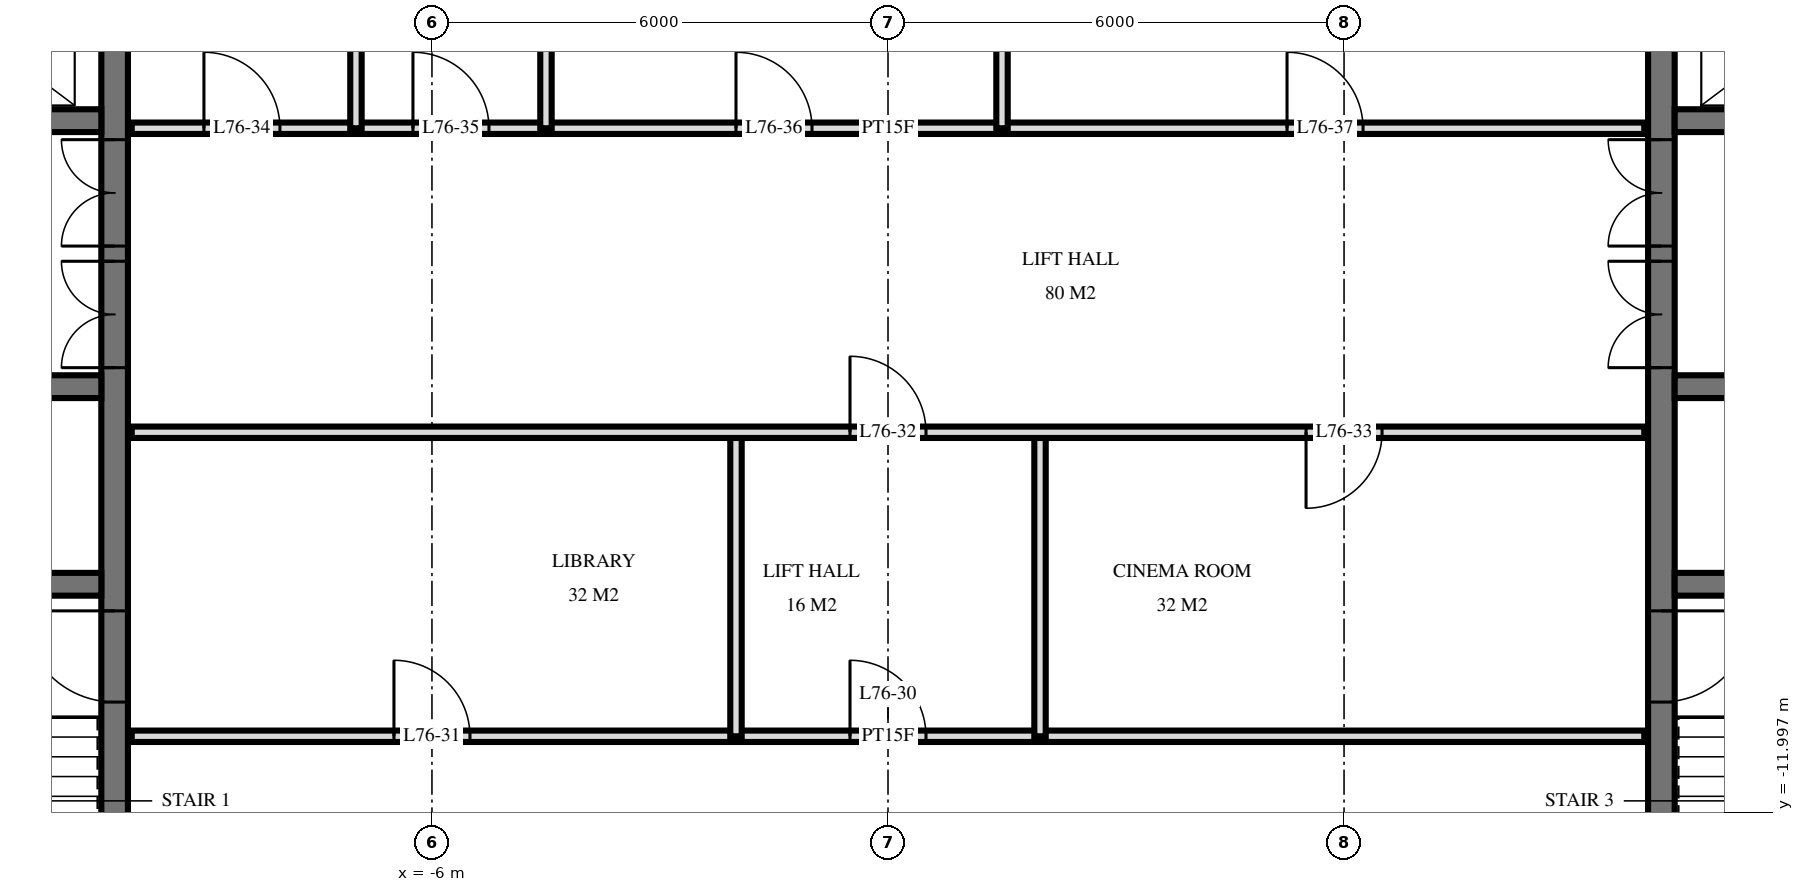
"""IFC4 building model, lengths in metres.
Left out: names, types, materials, properties, quantities, classifications, styles, units other than length and angle.
Written with IfcOpenShell. Run it as: python <this file> out.ifc"""

import sys

from ifc_helpers import new_model, si_unit, direction, frame, frame_2d, origin, place, context, subcontext, project, spatial, rectangle, extrude, element, fill, save


model = new_model("IFC4")
c1 = context("Model", 3, precision=1e-05, world=origin(), true_north=direction((0.0, 1.0)))
c2 = subcontext(c1, "Body", "Model", "MODEL_VIEW")
j1 = project(units=[si_unit("LENGTHUNIT", "METRE"), si_unit("PLANEANGLEUNIT", "RADIAN")], contexts=[c1])
p1 = place(None, origin())
s1 = spatial("IfcSite", under=j1, at=p1, CompositionType="ELEMENT")
p2 = place(p1, origin())
s2 = spatial("IfcBuilding", under=s1, at=p2, CompositionType="ELEMENT")
p3 = place(p2, frame((0.0, 0.0, 287.6)))
s3 = spatial("IfcBuildingStorey", under=s2, at=p3, CompositionType="ELEMENT", Elevation=287.6)
p4 = place(p3, frame((-10.175, -14.55, 0.0), z_axis=(0.0, 0.0, 1.0), x_axis=(0.0, 1.0, 0.0)))
e1 = element("IfcWall", 1, at=p4, inside=s3, PredefinedType="SHEAR", context=c2, shape_type="SweptSolid", body=[
    extrude(rectangle(XDim=14.1, YDim=0.35, at=frame_2d((7.05, 0.0))), origin(), (0.0, 0.0, 1.0), 3.5),
])
p5 = place(p4, frame((8.4, 0.0, 0.0)))
e2 = element("IfcOpeningElement", 2, at=p5, cuts=e1, PredefinedType="OPENING", context=c2, shape_type="SweptSolid", body=[
    extrude(rectangle(XDim=1.4, YDim=2.4, at=frame_2d((0.7, 1.2))), frame((0.0, 0.185, 0.0), z_axis=(0.0, -1.0, 0.0), x_axis=(1.0, 0.0, 0.0)), (0.0, 0.0, 1.0), 0.37),
])
p6 = place(p4, frame((10.0, 0.0, 0.0)))
e3 = element("IfcOpeningElement", 3, at=p6, cuts=e1, PredefinedType="OPENING", context=c2, shape_type="SweptSolid", body=[
    extrude(rectangle(XDim=1.4, YDim=2.4, at=frame_2d((0.7, 1.2))), frame((0.0, 0.185, 0.0), z_axis=(0.0, -1.0, 0.0), x_axis=(1.0, 0.0, 0.0)), (0.0, 0.0, 1.0), 0.37),
])
p7 = place(p4, frame((4.0, 0.0, 0.0)))
e4 = element("IfcOpeningElement", 4, at=p7, cuts=e1, PredefinedType="OPENING", context=c2, shape_type="SweptSolid", body=[
    extrude(rectangle(XDim=1.2, YDim=2.1, at=frame_2d((0.6, 1.05))), frame((0.0, 0.185, 0.0), z_axis=(0.0, -1.0, 0.0), x_axis=(1.0, 0.0, 0.0)), (0.0, 0.0, 1.0), 0.37),
])
p8 = place(p3, frame((-19.05, -2.9, 0.0), z_axis=(0.0, 0.0, 1.0), x_axis=(1.0, 0.0, 0.0)))
e5 = element("IfcWall", 5, at=p8, inside=s3, PredefinedType="SHEAR", context=c2, shape_type="SweptSolid", body=[
    extrude(rectangle(XDim=8.7, YDim=0.3, at=frame_2d((4.35, 0.0))), origin(), (0.0, 0.0, 1.0), 3.5),
])
p9 = place(p8, frame((6.8, 0.0, 0.0)))
e6 = element("IfcOpeningElement", 6, at=p9, cuts=e5, PredefinedType="OPENING", context=c2, shape_type="SweptSolid", body=[
    extrude(rectangle(XDim=1.1, YDim=2.1, at=frame_2d((0.55, 1.05))), frame((0.0, 0.16, 0.0), z_axis=(0.0, -1.0, 0.0), x_axis=(1.0, 0.0, 0.0)), (0.0, 0.0, 1.0), 0.32),
])
p10 = place(p8, frame((3.8, 0.0, 0.0)))
e7 = element("IfcOpeningElement", 7, at=p10, cuts=e5, PredefinedType="OPENING", context=c2, shape_type="SweptSolid", body=[
    extrude(rectangle(XDim=1.1, YDim=2.1, at=frame_2d((0.55, 1.05))), frame((0.0, 0.16, 0.0), z_axis=(0.0, -1.0, 0.0), x_axis=(1.0, 0.0, 0.0)), (0.0, 0.0, 1.0), 0.32),
])
p11 = place(p8, frame((1.613, 0.0, 0.0)))
e8 = element("IfcOpeningElement", 8, at=p11, cuts=e5, PredefinedType="OPENING", context=c2, shape_type="SweptSolid", body=[
    extrude(rectangle(XDim=0.9, YDim=2.1, at=frame_2d((0.45, 1.05))), frame((0.0, 0.16, 0.0), z_axis=(0.0, -1.0, 0.0), x_axis=(1.0, 0.0, 0.0)), (0.0, 0.0, 1.0), 0.32),
])
p12 = place(p8, frame((0.188, 0.0, 0.0)))
e9 = element("IfcOpeningElement", 9, at=p12, cuts=e5, PredefinedType="OPENING", context=c2, shape_type="SweptSolid", body=[
    extrude(rectangle(XDim=0.9, YDim=2.1, at=frame_2d((0.45, 1.05))), frame((0.0, 0.16, 0.0), z_axis=(0.0, -1.0, 0.0), x_axis=(1.0, 0.0, 0.0)), (0.0, 0.0, 1.0), 0.32),
])
p13 = place(p3, frame((-19.05, -6.4, 0.0), z_axis=(0.0, 0.0, 1.0), x_axis=(1.0, 0.0, 0.0)))
e10 = element("IfcWall", 10, at=p13, inside=s3, PredefinedType="SHEAR", context=c2, shape_type="SweptSolid", body=[
    extrude(rectangle(XDim=8.7, YDim=0.3, at=frame_2d((4.35, 0.0))), origin(), (0.0, 0.0, 1.0), 3.5),
])
p14 = place(p13, frame((0.8, 0.0, 0.0)))
e11 = element("IfcOpeningElement", 11, at=p14, cuts=e10, PredefinedType="OPENING", context=c2, shape_type="SweptSolid", body=[
    extrude(rectangle(XDim=1.1, YDim=2.1, at=frame_2d((0.55, 1.05))), frame((0.0, 0.16, 0.0), z_axis=(0.0, -1.0, 0.0), x_axis=(1.0, 0.0, 0.0)), (0.0, 0.0, 1.0), 0.32),
])
p15 = place(p3, frame((-19.05, -9.0, 0.0), z_axis=(0.0, 0.0, 1.0), x_axis=(1.0, 0.0, 0.0)))
e12 = element("IfcWall", 12, at=p15, inside=s3, PredefinedType="SHEAR", context=c2, shape_type="SweptSolid", body=[
    extrude(rectangle(XDim=8.7, YDim=0.3, at=frame_2d((4.35, 0.0))), origin(), (0.0, 0.0, 1.0), 3.5),
])
p16 = place(p15, frame((3.8, 0.0, 0.0)))
e13 = element("IfcOpeningElement", 13, at=p16, cuts=e12, PredefinedType="OPENING", context=c2, shape_type="SweptSolid", body=[
    extrude(rectangle(XDim=1.1, YDim=2.1, at=frame_2d((0.55, 1.05))), frame((0.0, 0.16, 0.0), z_axis=(0.0, -1.0, 0.0), x_axis=(1.0, 0.0, 0.0)), (0.0, 0.0, 1.0), 0.32),
])
p17 = place(p3, frame((10.175, -14.55, 0.0), z_axis=(0.0, 0.0, 1.0), x_axis=(0.0, 1.0, 0.0)))
e14 = element("IfcWall", 14, at=p17, inside=s3, PredefinedType="SHEAR", context=c2, shape_type="SweptSolid", body=[
    extrude(rectangle(XDim=14.1, YDim=0.35, at=frame_2d((7.05, 0.0))), origin(), (0.0, 0.0, 1.0), 3.5),
])
p18 = place(p17, frame((8.4, 0.0, 0.0)))
e15 = element("IfcOpeningElement", 15, at=p18, cuts=e14, PredefinedType="OPENING", context=c2, shape_type="SweptSolid", body=[
    extrude(rectangle(XDim=1.4, YDim=2.4, at=frame_2d((0.7, 1.2))), frame((0.0, 0.185, 0.0), z_axis=(0.0, -1.0, 0.0), x_axis=(1.0, 0.0, 0.0)), (0.0, 0.0, 1.0), 0.37),
])
p19 = place(p17, frame((10.0, 0.0, 0.0)))
e16 = element("IfcOpeningElement", 16, at=p19, cuts=e14, PredefinedType="OPENING", context=c2, shape_type="SweptSolid", body=[
    extrude(rectangle(XDim=1.4, YDim=2.4, at=frame_2d((0.7, 1.2))), frame((0.0, 0.185, 0.0), z_axis=(0.0, -1.0, 0.0), x_axis=(1.0, 0.0, 0.0)), (0.0, 0.0, 1.0), 0.37),
])
p20 = place(p17, frame((4.0, 0.0, 0.0)))
e17 = element("IfcOpeningElement", 17, at=p20, cuts=e14, PredefinedType="OPENING", context=c2, shape_type="SweptSolid", body=[
    extrude(rectangle(XDim=1.2, YDim=2.1, at=frame_2d((0.6, 1.05))), frame((0.0, 0.185, 0.0), z_axis=(0.0, -1.0, 0.0), x_axis=(1.0, 0.0, 0.0)), (0.0, 0.0, 1.0), 0.37),
])
p21 = place(p3, frame((10.35, -2.9, 0.0), z_axis=(0.0, 0.0, 1.0), x_axis=(1.0, 0.0, 0.0)))
e18 = element("IfcWall", 18, at=p21, inside=s3, PredefinedType="SHEAR", context=c2, shape_type="SweptSolid", body=[
    extrude(rectangle(XDim=8.7, YDim=0.3, at=frame_2d((4.35, 0.0))), origin(), (0.0, 0.0, 1.0), 3.5),
])
p22 = place(p21, frame((0.8, 0.0, 0.0)))
e19 = element("IfcOpeningElement", 19, at=p22, cuts=e18, PredefinedType="OPENING", context=c2, shape_type="SweptSolid", body=[
    extrude(rectangle(XDim=1.1, YDim=2.1, at=frame_2d((0.55, 1.05))), frame((0.0, 0.16, 0.0), z_axis=(0.0, -1.0, 0.0), x_axis=(1.0, 0.0, 0.0)), (0.0, 0.0, 1.0), 0.32),
])
p23 = place(p21, frame((3.8, 0.0, 0.0)))
e20 = element("IfcOpeningElement", 20, at=p23, cuts=e18, PredefinedType="OPENING", context=c2, shape_type="SweptSolid", body=[
    extrude(rectangle(XDim=1.1, YDim=2.1, at=frame_2d((0.55, 1.05))), frame((0.0, 0.16, 0.0), z_axis=(0.0, -1.0, 0.0), x_axis=(1.0, 0.0, 0.0)), (0.0, 0.0, 1.0), 0.32),
])
p24 = place(p21, frame((6.188, 0.0, 0.0)))
e21 = element("IfcOpeningElement", 21, at=p24, cuts=e18, PredefinedType="OPENING", context=c2, shape_type="SweptSolid", body=[
    extrude(rectangle(XDim=0.9, YDim=2.1, at=frame_2d((0.45, 1.05))), frame((0.0, 0.16, 0.0), z_axis=(0.0, -1.0, 0.0), x_axis=(1.0, 0.0, 0.0)), (0.0, 0.0, 1.0), 0.32),
])
p25 = place(p21, frame((7.613, 0.0, 0.0)))
e22 = element("IfcOpeningElement", 22, at=p25, cuts=e18, PredefinedType="OPENING", context=c2, shape_type="SweptSolid", body=[
    extrude(rectangle(XDim=0.9, YDim=2.1, at=frame_2d((0.45, 1.05))), frame((0.0, 0.16, 0.0), z_axis=(0.0, -1.0, 0.0), x_axis=(1.0, 0.0, 0.0)), (0.0, 0.0, 1.0), 0.32),
])
p26 = place(p3, frame((10.35, -6.4, 0.0), z_axis=(0.0, 0.0, 1.0), x_axis=(1.0, 0.0, 0.0)))
e23 = element("IfcWall", 23, at=p26, inside=s3, PredefinedType="SHEAR", context=c2, shape_type="SweptSolid", body=[
    extrude(rectangle(XDim=8.7, YDim=0.3, at=frame_2d((4.35, 0.0))), origin(), (0.0, 0.0, 1.0), 3.5),
])
p27 = place(p26, frame((6.8, 0.0, 0.0)))
e24 = element("IfcOpeningElement", 24, at=p27, cuts=e23, PredefinedType="OPENING", context=c2, shape_type="SweptSolid", body=[
    extrude(rectangle(XDim=1.1, YDim=2.1, at=frame_2d((0.55, 1.05))), frame((0.0, 0.16, 0.0), z_axis=(0.0, -1.0, 0.0), x_axis=(1.0, 0.0, 0.0)), (0.0, 0.0, 1.0), 0.32),
])
p28 = place(p3, frame((10.35, -9.0, 0.0), z_axis=(0.0, 0.0, 1.0), x_axis=(1.0, 0.0, 0.0)))
e25 = element("IfcWall", 25, at=p28, inside=s3, PredefinedType="SHEAR", context=c2, shape_type="SweptSolid", body=[
    extrude(rectangle(XDim=8.7, YDim=0.3, at=frame_2d((4.35, 0.0))), origin(), (0.0, 0.0, 1.0), 3.5),
])
p29 = place(p28, frame((3.8, 0.0, 0.0)))
e26 = element("IfcOpeningElement", 26, at=p29, cuts=e25, PredefinedType="OPENING", context=c2, shape_type="SweptSolid", body=[
    extrude(rectangle(XDim=1.1, YDim=2.1, at=frame_2d((0.55, 1.05))), frame((0.0, 0.16, 0.0), z_axis=(0.0, -1.0, 0.0), x_axis=(1.0, 0.0, 0.0)), (0.0, 0.0, 1.0), 0.32),
])
p30 = place(p3, frame((2.0, -11.0, 0.0), z_axis=(0.0, 0.0, 1.0), x_axis=(0.0, 1.0, 0.0)))
e27 = element("IfcWall", 27, at=p30, inside=s3, PredefinedType="PARTITIONING", context=c2, shape_type="SweptSolid", body=[
    extrude(rectangle(XDim=4.0, YDim=0.15, at=frame_2d((2.0, 0.0))), origin(), (0.0, 0.0, 1.0), 3.22),
])
p31 = place(p3, frame((1.5, -3.0, 0.0), z_axis=(0.0, 0.0, 1.0), x_axis=(0.0, 1.0, 0.0)))
e28 = element("IfcWall", 28, at=p31, inside=s3, PredefinedType="PARTITIONING", context=c2, shape_type="SweptSolid", body=[
    extrude(rectangle(XDim=4.02, YDim=0.15, at=frame_2d((2.01, 0.0))), origin(), (0.0, 0.0, 1.0), 3.22),
])
p32 = place(p3, frame((-2.0, -11.0, 0.0), z_axis=(0.0, 0.0, 1.0), x_axis=(0.0, 1.0, 0.0)))
e29 = element("IfcWall", 29, at=p32, inside=s3, PredefinedType="PARTITIONING", context=c2, shape_type="SweptSolid", body=[
    extrude(rectangle(XDim=4.0, YDim=0.15, at=frame_2d((2.0, 0.0))), origin(), (0.0, 0.0, 1.0), 3.22),
])
for number, where, z_axis, x_axis in (
    (30, (-4.5, -3.0, 0.0), (0.0, 0.0, 1.0), (0.0, 1.0, 0.0)),
    (31, (-7.0, -3.0, 0.0), (0.0, 0.0, 1.0), (0.0, 1.0, 0.0)),
):
    element("IfcWall", number, at=place(p3, frame(where, z_axis=z_axis, x_axis=x_axis)), inside=s3, PredefinedType="PLUMBINGWALL", context=c2, shape_type="SweptSolid", body=[
        extrude(rectangle(XDim=4.02, YDim=0.15, at=frame_2d((2.01, 0.0))), origin(), (0.0, 0.0, 1.0), 3.22),
    ])
p33 = place(p3, frame((-9.95, -11.0, 0.0), z_axis=(0.0, 0.0, 1.0), x_axis=(1.0, 0.0, 0.0)))
e32 = element("IfcWall", 32, at=p33, inside=s3, PredefinedType="PARTITIONING", context=c2, shape_type="SweptSolid", body=[
    extrude(rectangle(XDim=19.9, YDim=0.15, at=frame_2d((9.95, 0.0))), origin(), (0.0, 0.0, 1.0), 3.22),
])
p34 = place(p33, frame((9.45, 0.0, 0.0)))
e33 = element("IfcOpeningElement", 33, at=p34, cuts=e32, PredefinedType="OPENING", context=c2, shape_type="SweptSolid", body=[
    extrude(rectangle(XDim=1.0, YDim=2.1, at=frame_2d((0.5, 1.05))), frame((0.0, 0.085, 0.0), z_axis=(0.0, -1.0, 0.0), x_axis=(1.0, 0.0, 0.0)), (0.0, 0.0, 1.0), 0.17),
])
p35 = place(p33, frame((3.45, 0.0, 0.0)))
e34 = element("IfcOpeningElement", 34, at=p35, cuts=e32, PredefinedType="OPENING", context=c2, shape_type="SweptSolid", body=[
    extrude(rectangle(XDim=1.0, YDim=2.1, at=frame_2d((0.5, 1.05))), frame((0.0, 0.085, 0.0), z_axis=(0.0, -1.0, 0.0), x_axis=(1.0, 0.0, 0.0)), (0.0, 0.0, 1.0), 0.17),
])
p36 = place(p3, frame((-9.95, -7.0, 0.0), z_axis=(0.0, 0.0, 1.0), x_axis=(1.0, 0.0, 0.0)))
e35 = element("IfcWall", 35, at=p36, inside=s3, PredefinedType="PARTITIONING", context=c2, shape_type="SweptSolid", body=[
    extrude(rectangle(XDim=19.9, YDim=0.15, at=frame_2d((9.95, 0.0))), origin(), (0.0, 0.0, 1.0), 3.22),
])
p37 = place(p36, frame((9.45, 0.0, 0.0)))
e36 = element("IfcOpeningElement", 36, at=p37, cuts=e35, PredefinedType="OPENING", context=c2, shape_type="SweptSolid", body=[
    extrude(rectangle(XDim=1.0, YDim=2.1, at=frame_2d((0.5, 1.05))), frame((0.0, 0.085, 0.0), z_axis=(0.0, -1.0, 0.0), x_axis=(1.0, 0.0, 0.0)), (0.0, 0.0, 1.0), 0.17),
])
p38 = place(p36, frame((15.45, 0.0, 0.0)))
e37 = element("IfcOpeningElement", 37, at=p38, cuts=e35, PredefinedType="OPENING", context=c2, shape_type="SweptSolid", body=[
    extrude(rectangle(XDim=1.0, YDim=2.1, at=frame_2d((0.5, 1.05))), frame((0.0, 0.085, 0.0), z_axis=(0.0, -1.0, 0.0), x_axis=(1.0, 0.0, 0.0)), (0.0, 0.0, 1.0), 0.17),
])
p39 = place(p3, frame((-9.95, -3.0, 0.0), z_axis=(0.0, 0.0, 1.0), x_axis=(1.0, 0.0, 0.0)))
e38 = element("IfcWall", 38, at=p39, inside=s3, PredefinedType="PARTITIONING", context=c2, shape_type="SweptSolid", body=[
    extrude(rectangle(XDim=19.9, YDim=0.15, at=frame_2d((9.95, 0.0))), origin(), (0.0, 0.0, 1.0), 3.22),
])
p40 = place(p39, frame((0.95, 0.0, 0.0)))
e39 = element("IfcOpeningElement", 39, at=p40, cuts=e38, PredefinedType="OPENING", context=c2, shape_type="SweptSolid", body=[
    extrude(rectangle(XDim=1.0, YDim=2.1, at=frame_2d((0.5, 1.05))), frame((0.0, 0.085, 0.0), z_axis=(0.0, -1.0, 0.0), x_axis=(1.0, 0.0, 0.0)), (0.0, 0.0, 1.0), 0.17),
])
p41 = place(p39, frame((3.7, 0.0, 0.0)))
e40 = element("IfcOpeningElement", 40, at=p41, cuts=e38, PredefinedType="OPENING", context=c2, shape_type="SweptSolid", body=[
    extrude(rectangle(XDim=1.0, YDim=2.1, at=frame_2d((0.5, 1.05))), frame((0.0, 0.085, 0.0), z_axis=(0.0, -1.0, 0.0), x_axis=(1.0, 0.0, 0.0)), (0.0, 0.0, 1.0), 0.17),
])
p42 = place(p39, frame((7.95, 0.0, 0.0)))
e41 = element("IfcOpeningElement", 41, at=p42, cuts=e38, PredefinedType="OPENING", context=c2, shape_type="SweptSolid", body=[
    extrude(rectangle(XDim=1.0, YDim=2.1, at=frame_2d((0.5, 1.05))), frame((0.0, 0.085, 0.0), z_axis=(0.0, -1.0, 0.0), x_axis=(1.0, 0.0, 0.0)), (0.0, 0.0, 1.0), 0.17),
])
p43 = place(p39, frame((15.2, 0.0, 0.0)))
e42 = element("IfcOpeningElement", 42, at=p43, cuts=e38, PredefinedType="OPENING", context=c2, shape_type="SweptSolid", body=[
    extrude(rectangle(XDim=1.0, YDim=2.1, at=frame_2d((0.5, 1.05))), frame((0.0, 0.085, 0.0), z_axis=(0.0, -1.0, 0.0), x_axis=(1.0, 0.0, 0.0)), (0.0, 0.0, 1.0), 0.17),
])
p44 = place(p5, origin())
e43 = element("IfcDoor", 43, at=p44, inside=s3, OperationType="DOUBLE_DOOR_SINGLE_SWING", PredefinedType="DOOR", context=c2, shape_type="SweptSolid", body=[
    extrude(rectangle(XDim=1.4, YDim=2.4, at=frame_2d((0.7, 1.2))), frame((0.0, 0.025, 0.0), z_axis=(0.0, -1.0, 0.0), x_axis=(1.0, 0.0, 0.0)), (0.0, 0.0, 1.0), 0.05),
])
fill(e2, e43)
p45 = place(p6, origin())
e44 = element("IfcDoor", 44, at=p45, inside=s3, OperationType="DOUBLE_DOOR_SINGLE_SWING", PredefinedType="DOOR", context=c2, shape_type="SweptSolid", body=[
    extrude(rectangle(XDim=1.4, YDim=2.4, at=frame_2d((0.7, 1.2))), frame((0.0, 0.025, 0.0), z_axis=(0.0, -1.0, 0.0), x_axis=(1.0, 0.0, 0.0)), (0.0, 0.0, 1.0), 0.05),
])
fill(e3, e44)
p46 = place(p7, origin())
e45 = element("IfcDoor", 45, at=p46, inside=s3, OperationType="SINGLE_SWING_LEFT", PredefinedType="DOOR", context=c2, shape_type="SweptSolid", body=[
    extrude(rectangle(XDim=1.2, YDim=2.1, at=frame_2d((0.6, 1.05))), frame((0.0, 0.025, 0.0), z_axis=(0.0, -1.0, 0.0), x_axis=(1.0, 0.0, 0.0)), (0.0, 0.0, 1.0), 0.05),
])
fill(e4, e45)
p47 = place(p18, origin())
e46 = element("IfcDoor", 46, at=p47, inside=s3, OperationType="DOUBLE_DOOR_SINGLE_SWING", PredefinedType="DOOR", context=c2, shape_type="SweptSolid", body=[
    extrude(rectangle(XDim=1.4, YDim=2.4, at=frame_2d((0.7, 1.2))), frame((0.0, 0.025, 0.0), z_axis=(0.0, -1.0, 0.0), x_axis=(1.0, 0.0, 0.0)), (0.0, 0.0, 1.0), 0.05),
])
fill(e15, e46)
p48 = place(p19, origin())
e47 = element("IfcDoor", 47, at=p48, inside=s3, OperationType="DOUBLE_DOOR_SINGLE_SWING", PredefinedType="DOOR", context=c2, shape_type="SweptSolid", body=[
    extrude(rectangle(XDim=1.4, YDim=2.4, at=frame_2d((0.7, 1.2))), frame((0.0, 0.025, 0.0), z_axis=(0.0, -1.0, 0.0), x_axis=(1.0, 0.0, 0.0)), (0.0, 0.0, 1.0), 0.05),
])
fill(e16, e47)
p49 = place(p20, frame((0.6, 0.0, 0.0), z_axis=(0.0, 0.0, 1.0), x_axis=(-1.0, 0.0, 0.0)))
e48 = element("IfcDoor", 48, at=p49, inside=s3, OperationType="SINGLE_SWING_RIGHT", PredefinedType="DOOR", context=c2, shape_type="SweptSolid", body=[
    extrude(rectangle(XDim=1.2, YDim=2.1, at=frame_2d((0.0, 1.05))), frame((0.0, -0.025, 0.0), z_axis=(0.0, 1.0, 0.0), x_axis=(-1.0, 0.0, 0.0)), (0.0, 0.0, 1.0), 0.05),
])
fill(e17, e48)
p50 = place(p34, origin())
e49 = element("IfcDoor", 49, at=p50, inside=s3, OperationType="SINGLE_SWING_RIGHT", PredefinedType="DOOR", context=c2, shape_type="SweptSolid", body=[
    extrude(rectangle(XDim=1.0, YDim=2.1, at=frame_2d((0.5, 1.05))), frame((0.0, 0.025, 0.0), z_axis=(0.0, -1.0, 0.0), x_axis=(1.0, 0.0, 0.0)), (0.0, 0.0, 1.0), 0.05),
])
fill(e33, e49)
p51 = place(p35, origin())
e50 = element("IfcDoor", 50, at=p51, inside=s3, OperationType="SINGLE_SWING_RIGHT", PredefinedType="DOOR", context=c2, shape_type="SweptSolid", body=[
    extrude(rectangle(XDim=1.0, YDim=2.1, at=frame_2d((0.5, 1.05))), frame((0.0, 0.025, 0.0), z_axis=(0.0, -1.0, 0.0), x_axis=(1.0, 0.0, 0.0)), (0.0, 0.0, 1.0), 0.05),
])
fill(e34, e50)
p52 = place(p37, origin())
e51 = element("IfcDoor", 51, at=p52, inside=s3, OperationType="SINGLE_SWING_RIGHT", PredefinedType="DOOR", context=c2, shape_type="SweptSolid", body=[
    extrude(rectangle(XDim=1.0, YDim=2.1, at=frame_2d((0.5, 1.05))), frame((0.0, 0.025, 0.0), z_axis=(0.0, -1.0, 0.0), x_axis=(1.0, 0.0, 0.0)), (0.0, 0.0, 1.0), 0.05),
])
fill(e36, e51)
p53 = place(p38, frame((0.5, 0.0, 0.0), z_axis=(0.0, 0.0, 1.0), x_axis=(-1.0, 0.0, 0.0)))
e52 = element("IfcDoor", 52, at=p53, inside=s3, OperationType="SINGLE_SWING_LEFT", PredefinedType="DOOR", context=c2, shape_type="SweptSolid", body=[
    extrude(rectangle(XDim=1.0, YDim=2.1, at=frame_2d((0.0, 1.05))), frame((0.0, -0.025, 0.0), z_axis=(0.0, 1.0, 0.0), x_axis=(-1.0, 0.0, 0.0)), (0.0, 0.0, 1.0), 0.05),
])
fill(e37, e52)
p54 = place(p40, origin())
e53 = element("IfcDoor", 53, at=p54, inside=s3, OperationType="SINGLE_SWING_RIGHT", PredefinedType="DOOR", context=c2, shape_type="SweptSolid", body=[
    extrude(rectangle(XDim=1.0, YDim=2.1, at=frame_2d((0.5, 1.05))), frame((0.0, 0.025, 0.0), z_axis=(0.0, -1.0, 0.0), x_axis=(1.0, 0.0, 0.0)), (0.0, 0.0, 1.0), 0.05),
])
fill(e39, e53)
p55 = place(p41, origin())
e54 = element("IfcDoor", 54, at=p55, inside=s3, OperationType="SINGLE_SWING_RIGHT", PredefinedType="DOOR", context=c2, shape_type="SweptSolid", body=[
    extrude(rectangle(XDim=1.0, YDim=2.1, at=frame_2d((0.5, 1.05))), frame((0.0, 0.025, 0.0), z_axis=(0.0, -1.0, 0.0), x_axis=(1.0, 0.0, 0.0)), (0.0, 0.0, 1.0), 0.05),
])
fill(e40, e54)
p56 = place(p42, origin())
e55 = element("IfcDoor", 55, at=p56, inside=s3, OperationType="SINGLE_SWING_RIGHT", PredefinedType="DOOR", context=c2, shape_type="SweptSolid", body=[
    extrude(rectangle(XDim=1.0, YDim=2.1, at=frame_2d((0.5, 1.05))), frame((0.0, 0.025, 0.0), z_axis=(0.0, -1.0, 0.0), x_axis=(1.0, 0.0, 0.0)), (0.0, 0.0, 1.0), 0.05),
])
fill(e41, e55)
p57 = place(p43, origin())
e56 = element("IfcDoor", 56, at=p57, inside=s3, OperationType="SINGLE_SWING_RIGHT", PredefinedType="DOOR", context=c2, shape_type="SweptSolid", body=[
    extrude(rectangle(XDim=1.0, YDim=2.1, at=frame_2d((0.5, 1.05))), frame((0.0, 0.025, 0.0), z_axis=(0.0, -1.0, 0.0), x_axis=(1.0, 0.0, 0.0)), (0.0, 0.0, 1.0), 0.05),
])
fill(e42, e56)
save(model, sys.argv[1])
